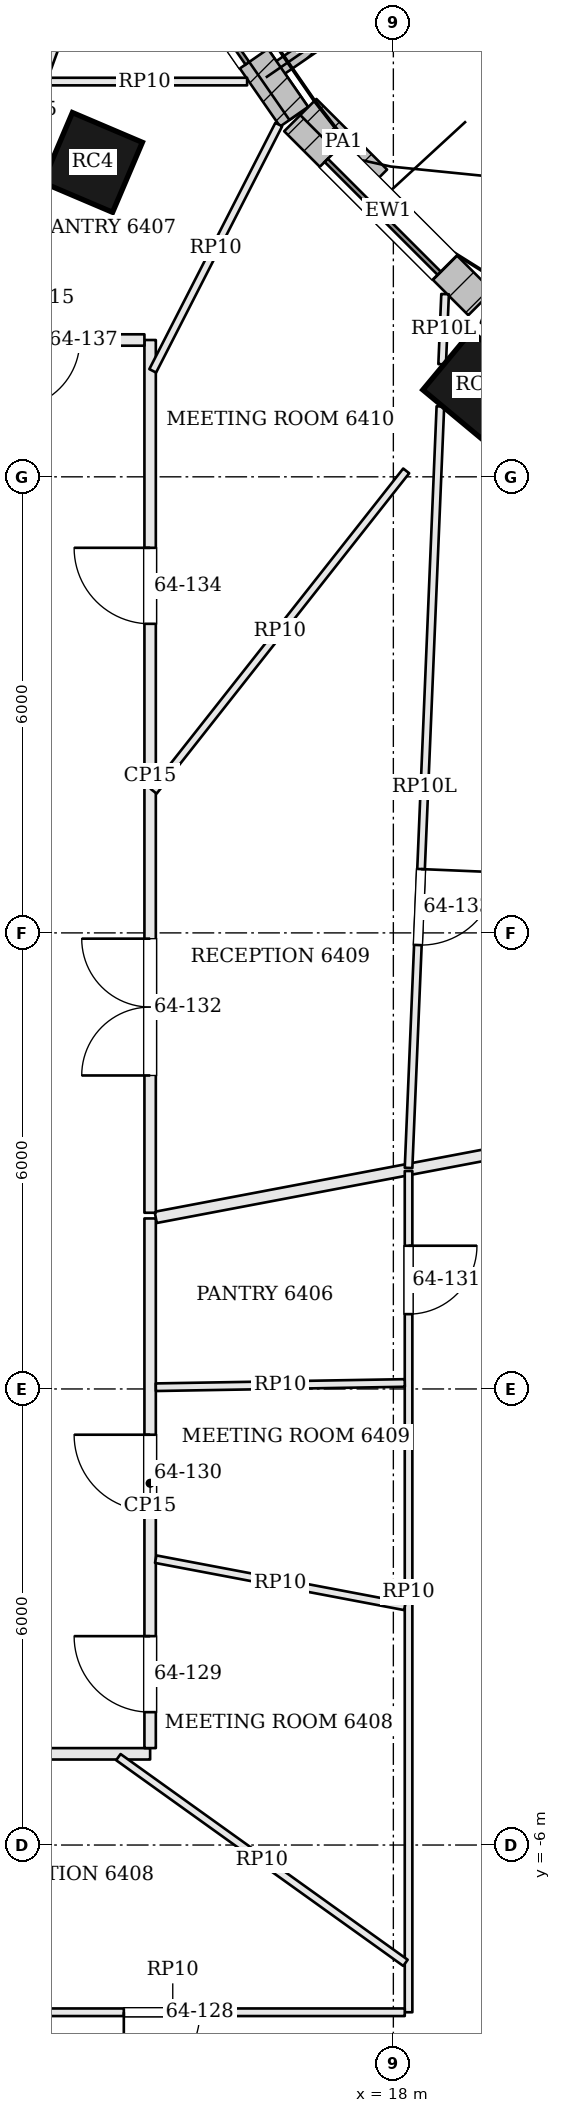
"""IFC4 building model, lengths in metres.
Left out: names, types, materials, properties, quantities, classifications, styles, units other than length and angle.
Written with IfcOpenShell. Run it as: python <this file> out.ifc"""

import sys

from ifc_helpers import new_model, si_unit, direction, frame, frame_2d, origin, origin_2d, place, context, subcontext, project, spatial, rectangle, extrude, element, fill, save


model = new_model("IFC4")
c1 = context("Model", 3, precision=1e-05, world=origin(), true_north=direction((0.0, 1.0)))
c2 = subcontext(c1, "Body", "Model", "MODEL_VIEW")
j1 = project(units=[si_unit("LENGTHUNIT", "METRE"), si_unit("PLANEANGLEUNIT", "RADIAN")], contexts=[c1])
p1 = place(None, origin())
s1 = spatial("IfcSite", under=j1, at=p1, CompositionType="ELEMENT")
p2 = place(p1, origin())
s2 = spatial("IfcBuilding", under=s1, at=p2, CompositionType="ELEMENT")
p3 = place(p2, frame((0.0, 0.0, 260.4)))
s3 = spatial("IfcBuildingStorey", under=s2, at=p3, CompositionType="ELEMENT", Elevation=260.4)
for number, where, z_axis, x_axis in (
    (1, (19.092, 13.209, 0.0), (0.0, 0.0, 1.0), (-0.769, 0.639, 0.0)),
    (2, (14.042, 16.136, 0.0), (0.0, 0.0, 1.0), (-0.92, 0.392, 0.0)),
):
    element("IfcColumn", number, at=place(p3, frame(where, z_axis=z_axis, x_axis=x_axis)), inside=s3, PredefinedType="COLUMN", context=c2, shape_type="SweptSolid", body=[
        extrude(rectangle(XDim=1.0, YDim=1.0, at=origin_2d()), origin(), (0.0, 0.0, 1.0), 3.1),
    ])
p4 = place(p3, frame((19.145, 14.285, 0.0), z_axis=(0.0, 0.0, 1.0), x_axis=(-0.707427521052, 0.706785895769, 0.0)))
e3 = element("IfcWall", 3, at=p4, inside=s3, PredefinedType="SOLIDWALL", context=c2, shape_type="SweptSolid", body=[
    extrude(rectangle(XDim=3.425, YDim=0.45, at=frame_2d((1.712, 0.0))), origin(), (0.0, 0.0, 1.0), 3.6),
])
p5 = place(p4, frame((0.662, 0.0, 0.9)))
e4 = element("IfcOpeningElement", 4, at=p5, cuts=e3, PredefinedType="OPENING", context=c2, shape_type="SweptSolid", body=[
    extrude(rectangle(XDim=2.1, YDim=1.8, at=frame_2d((1.05, 0.9))), frame((0.0, 0.235, 0.0), z_axis=(0.0, -1.0, 0.0), x_axis=(1.0, 0.0, 0.0)), (0.0, 0.0, 1.0), 0.47),
])
p6 = place(p3, frame((16.695, 16.737, 0.0), z_axis=(0.0, 0.0, 1.0), x_axis=(-0.569652445465, 0.821885692402, 0.0)))
e5 = element("IfcWall", 5, at=p6, inside=s3, PredefinedType="SOLIDWALL", context=c2, shape_type="SweptSolid", body=[
    extrude(rectangle(XDim=3.959, YDim=0.45, at=frame_2d((1.979, 0.0))), origin(), (0.0, 0.0, 1.0), 3.6),
])
p7 = place(p6, frame((0.929, 0.0, 0.9)))
e6 = element("IfcOpeningElement", 6, at=p7, cuts=e5, PredefinedType="OPENING", context=c2, shape_type="SweptSolid", body=[
    extrude(rectangle(XDim=2.1, YDim=1.8, at=frame_2d((1.05, 0.9))), frame((0.0, 0.235, 0.0), z_axis=(0.0, -1.0, 0.0), x_axis=(1.0, 0.0, 0.0)), (0.0, 0.0, 1.0), 0.47),
])
p8 = place(p3, frame((16.322, 17.253, 0.0), z_axis=(0.0, 0.0, 1.0), x_axis=(0.824440606412, 0.565948483962, 0.0)))
e7 = element("IfcWall", 7, at=p8, inside=s3, PredefinedType="SOLIDWALL", context=c2, shape_type="SweptSolid", body=[
    extrude(rectangle(XDim=1.75, YDim=0.2, at=frame_2d((0.875, 0.0))), origin(), (0.0, 0.0, 1.0), 3.6),
])
p9 = place(p3, frame((17.811, 15.936, 3.9), z_axis=(0.0, 0.0, 1.0), x_axis=(-0.707385370732, 0.706828081837, 0.0)))
e8 = element("IfcWall", 8, at=p9, inside=s3, PredefinedType="PARAPET", context=c2, shape_type="SweptSolid", body=[
    extrude(rectangle(XDim=1.314, YDim=0.3, at=frame_2d((0.657, 0.0))), origin(), (0.0, 0.0, 1.0), 1.1),
])
p10 = place(p3, frame((16.755, 16.781, 3.9), z_axis=(0.0, 0.0, 1.0), x_axis=(-0.569678588486, 0.821867571948, 0.0)))
e9 = element("IfcWall", 9, at=p10, inside=s3, PredefinedType="PARAPET", context=c2, shape_type="SweptSolid", body=[
    extrude(rectangle(XDim=3.873, YDim=0.3, at=frame_2d((1.937, 0.0))), origin(), (0.0, 0.0, 1.0), 1.1),
])
p11 = place(p3, frame((14.301, 19.789, 0.0), z_axis=(0.0, 0.0, 1.0), x_axis=(-0.342247171487, -0.939609958232, 0.0)))
e10 = element("IfcWall", 10, at=p11, inside=s3, PredefinedType="PARTITIONING", context=c2, shape_type="SweptSolid", body=[
    extrude(rectangle(XDim=6.299, YDim=0.15, at=frame_2d((3.149, 0.0))), origin(), (0.0, 0.0, 1.0), 2.984),
])
p12 = place(p3, frame((16.078, -16.125, 0.0), z_axis=(0.0, 0.0, 1.0), x_axis=(-0.455549457852, 0.890210475927, 0.0)))
e11 = element("IfcWall", 11, at=p12, inside=s3, PredefinedType="PARTITIONING", context=c2, shape_type="SweptSolid", body=[
    extrude(rectangle(XDim=12.646, YDim=0.15, at=frame_2d((6.323, 0.0))), origin(), (0.0, 0.0, 1.0), 2.984),
])
p13 = place(p3, frame((10.358, -4.8, 0.0), z_axis=(0.0, 0.0, 1.0), x_axis=(1.0, 0.0, 0.0)))
e12 = element("IfcWall", 12, at=p13, inside=s3, PredefinedType="PARTITIONING", context=c2, shape_type="SweptSolid", body=[
    extrude(rectangle(XDim=4.442, YDim=0.15, at=frame_2d((2.221, 0.0))), origin(), (0.0, 0.0, 1.0), 2.984),
])
p14 = place(p13, frame((1.444, 0.0, 0.0)))
e13 = element("IfcOpeningElement", 13, at=p14, cuts=e12, PredefinedType="OPENING", context=c2, shape_type="SweptSolid", body=[
    extrude(rectangle(XDim=1.0, YDim=2.1, at=frame_2d((0.5, 1.05))), frame((0.0, 0.085, 0.0), z_axis=(0.0, -1.0, 0.0), x_axis=(1.0, 0.0, 0.0)), (0.0, 0.0, 1.0), 0.17),
])
p15 = place(p3, frame((14.8, -4.725, 0.0), z_axis=(0.0, 0.0, 1.0), x_axis=(0.0, 1.0, 0.0)))
e14 = element("IfcWall", 14, at=p15, inside=s3, PredefinedType="PARTITIONING", context=c2, shape_type="SweptSolid", body=[
    extrude(rectangle(XDim=6.968, YDim=0.15, at=frame_2d((3.484, 0.0))), origin(), (0.0, 0.0, 1.0), 2.984),
])
p16 = place(p15, frame((0.473, 0.0, 0.0)))
e15 = element("IfcOpeningElement", 15, at=p16, cuts=e14, PredefinedType="OPENING", context=c2, shape_type="SweptSolid", body=[
    extrude(rectangle(XDim=1.0, YDim=2.4, at=frame_2d((0.5, 1.2))), frame((0.0, 0.085, 0.0), z_axis=(0.0, -1.0, 0.0), x_axis=(1.0, 0.0, 0.0)), (0.0, 0.0, 1.0), 0.17),
])
p17 = place(p15, frame((3.123, 0.0, 0.0)))
e16 = element("IfcOpeningElement", 16, at=p17, cuts=e14, PredefinedType="OPENING", context=c2, shape_type="SweptSolid", body=[
    extrude(rectangle(XDim=1.0, YDim=2.4, at=frame_2d((0.5, 1.2))), frame((0.0, 0.085, 0.0), z_axis=(0.0, -1.0, 0.0), x_axis=(1.0, 0.0, 0.0)), (0.0, 0.0, 1.0), 0.17),
])
p18 = place(p3, frame((27.332, 4.618, 0.0), z_axis=(0.0, 0.0, 1.0), x_axis=(-0.982506027703, -0.186230785661, 0.0)))
e17 = element("IfcWall", 17, at=p18, inside=s3, PredefinedType="PARTITIONING", context=c2, shape_type="SweptSolid", body=[
    extrude(rectangle(XDim=12.68, YDim=0.15, at=frame_2d((6.34, 0.0))), origin(), (0.0, 0.0, 1.0), 2.58),
])
p19 = place(p3, frame((14.8, 2.318, 0.0), z_axis=(0.0, 0.0, 1.0), x_axis=(0.0, 1.0, 0.0)))
e18 = element("IfcWall", 18, at=p19, inside=s3, PredefinedType="PARTITIONING", context=c2, shape_type="SweptSolid", body=[
    extrude(rectangle(XDim=11.482, YDim=0.15, at=frame_2d((5.741, 0.0))), origin(), (0.0, 0.0, 1.0), 2.984),
])
p20 = place(p19, frame((1.806, 0.0, 0.0)))
e19 = element("IfcOpeningElement", 19, at=p20, cuts=e18, PredefinedType="OPENING", context=c2, shape_type="SweptSolid", body=[
    extrude(rectangle(XDim=1.8, YDim=2.1, at=frame_2d((0.9, 1.05))), frame((0.0, 0.085, 0.0), z_axis=(0.0, -1.0, 0.0), x_axis=(1.0, 0.0, 0.0)), (0.0, 0.0, 1.0), 0.17),
])
p21 = place(p19, frame((7.748, 0.0, 0.0)))
e20 = element("IfcOpeningElement", 20, at=p21, cuts=e18, PredefinedType="OPENING", context=c2, shape_type="SweptSolid", body=[
    extrude(rectangle(XDim=1.0, YDim=2.4, at=frame_2d((0.5, 1.2))), frame((0.0, 0.085, 0.0), z_axis=(0.0, -1.0, 0.0), x_axis=(1.0, 0.0, 0.0)), (0.0, 0.0, 1.0), 0.17),
])
p22 = place(p3, frame((14.725, 13.8, 0.0), z_axis=(0.0, 0.0, 1.0), x_axis=(-1.0, 0.0, 0.0)))
e21 = element("IfcWall", 21, at=p22, inside=s3, PredefinedType="PARTITIONING", context=c2, shape_type="SweptSolid", body=[
    extrude(rectangle(XDim=2.531, YDim=0.15, at=frame_2d((1.266, 0.0))), origin(), (0.0, 0.0, 1.0), 2.984),
])
p23 = place(p22, frame((0.85, 0.0, 0.0)))
e22 = element("IfcOpeningElement", 22, at=p23, cuts=e21, PredefinedType="OPENING", context=c2, shape_type="SweptSolid", body=[
    extrude(rectangle(XDim=0.9, YDim=2.1, at=frame_2d((0.45, 1.05))), frame((0.0, 0.085, 0.0), z_axis=(0.0, -1.0, 0.0), x_axis=(1.0, 0.0, 0.0)), (0.0, 0.0, 1.0), 0.17),
])
p24 = place(p3, frame((18.2, 2.867, 0.0), z_axis=(0.0, 0.0, 1.0), x_axis=(0.0, -1.0, 0.0)))
e23 = element("IfcWall", 23, at=p24, inside=s3, PredefinedType="PARTITIONING", context=c2, shape_type="SweptSolid", body=[
    extrude(rectangle(XDim=11.067, YDim=0.1, at=frame_2d((5.534, 0.0))), origin(), (0.0, 0.0, 1.0), 2.984),
])
p25 = place(p24, frame((0.983, 0.0, 0.0)))
e24 = element("IfcOpeningElement", 24, at=p25, cuts=e23, PredefinedType="OPENING", context=c2, shape_type="SweptSolid", body=[
    extrude(rectangle(XDim=0.9, YDim=2.1, at=frame_2d((0.45, 1.05))), frame((0.0, 0.06, 0.0), z_axis=(0.0, -1.0, 0.0), x_axis=(1.0, 0.0, 0.0)), (0.0, 0.0, 1.0), 0.12),
])
p26 = place(p3, frame((18.15, -8.2, 0.0), z_axis=(0.0, 0.0, 1.0), x_axis=(-1.0, 0.0, 0.0)))
e25 = element("IfcWall", 25, at=p26, inside=s3, PredefinedType="PARTITIONING", context=c2, shape_type="SweptSolid", body=[
    extrude(rectangle(XDim=6.104, YDim=0.1, at=frame_2d((3.052, 0.0))), origin(), (0.0, 0.0, 1.0), 2.984),
])
p27 = place(p26, frame((2.696, 0.0, 0.0)))
e26 = element("IfcOpeningElement", 26, at=p27, cuts=e25, PredefinedType="OPENING", context=c2, shape_type="SweptSolid", body=[
    extrude(rectangle(XDim=1.0, YDim=2.1, at=frame_2d((0.5, 1.05))), frame((0.0, 0.06, 0.0), z_axis=(0.0, -1.0, 0.0), x_axis=(1.0, 0.0, 0.0)), (0.0, 0.0, 1.0), 0.12),
])
p28 = place(p3, frame((14.382, -4.844, 0.0), z_axis=(0.0, 0.0, 1.0), x_axis=(0.812905436978, -0.582395699273, 0.0)))
e27 = element("IfcWall", 27, at=p28, inside=s3, PredefinedType="PARTITIONING", context=c2, shape_type="SweptSolid", body=[
    extrude(rectangle(XDim=4.646, YDim=0.1, at=frame_2d((2.323, 0.0))), origin(), (0.0, 0.0, 1.0), 2.984),
])
p29 = place(p3, frame((14.874, -2.239, 0.0), z_axis=(0.0, 0.0, 1.0), x_axis=(0.982523240233, -0.186139953804, 0.0)))
e28 = element("IfcWall", 28, at=p29, inside=s3, PredefinedType="PARTITIONING", context=c2, shape_type="SweptSolid", body=[
    extrude(rectangle(XDim=3.335, YDim=0.1, at=frame_2d((1.668, 0.0))), origin(), (0.0, 0.0, 1.0), 2.984),
])
p30 = place(p3, frame((14.875, 0.023, 0.0), z_axis=(0.0, 0.0, 1.0), x_axis=(0.999854310099, 0.017069228941, 0.0)))
e29 = element("IfcWall", 29, at=p30, inside=s3, PredefinedType="PARTITIONING", context=c2, shape_type="SweptSolid", body=[
    extrude(rectangle(XDim=3.275, YDim=0.1, at=frame_2d((1.638, 0.0))), origin(), (0.0, 0.0, 1.0), 2.984),
])
p31 = place(p3, frame((13.379, 17.2, 0.0), z_axis=(0.0, 0.0, 1.0), x_axis=(1.0, 0.0, 0.0)))
e30 = element("IfcWall", 30, at=p31, inside=s3, PredefinedType="PARTITIONING", context=c2, shape_type="SweptSolid", body=[
    extrude(rectangle(XDim=2.697, YDim=0.1, at=frame_2d((1.349, 0.0))), origin(), (0.0, 0.0, 1.0), 2.984),
])
p32 = place(p3, frame((18.681, 14.404, 0.0), z_axis=(0.0, 0.0, 1.0), x_axis=(-0.04178454469, -0.999126644538, 0.0)))
e31 = element("IfcWall", 31, at=p32, inside=s3, PredefinedType="PARTITIONING", context=c2, shape_type="SweptSolid", body=[
    extrude(rectangle(XDim=0.923, YDim=0.1, at=frame_2d((0.461, 0.0))), origin(), (0.0, 0.0, 1.0), 2.58),
])
p33 = place(p3, frame((18.619, 12.926, 0.0), z_axis=(0.0, 0.0, 1.0), x_axis=(-0.041781443757, -0.999126774217, 0.0)))
e32 = element("IfcWall", 32, at=p33, inside=s3, PredefinedType="PARTITIONING", context=c2, shape_type="SweptSolid", body=[
    extrude(rectangle(XDim=10.027, YDim=0.1, at=frame_2d((5.014, 0.0))), origin(), (0.0, 0.0, 1.0), 2.58),
])
p34 = place(p33, frame((6.092, 0.0, 0.0)))
e33 = element("IfcOpeningElement", 33, at=p34, cuts=e32, PredefinedType="OPENING", context=c2, shape_type="SweptSolid", body=[
    extrude(rectangle(XDim=1.0, YDim=2.1, at=frame_2d((0.5, 1.05))), frame((0.0, 0.06, 0.0), z_axis=(0.0, -1.0, 0.0), x_axis=(1.0, 0.0, 0.0)), (0.0, 0.0, 1.0), 0.12),
])
p35 = place(p3, frame((14.846, 7.863, 0.0), z_axis=(0.0, 0.0, 1.0), x_axis=(0.619070377388, 0.785335512912, 0.0)))
e34 = element("IfcWall", 34, at=p35, inside=s3, PredefinedType="PARTITIONING", context=c2, shape_type="SweptSolid", body=[
    extrude(rectangle(XDim=5.367, YDim=0.1, at=frame_2d((2.684, 0.0))), origin(), (0.0, 0.0, 1.0), 2.984),
])
p36 = place(p3, frame((14.834, 13.394, 0.0), z_axis=(0.0, 0.0, 1.0), x_axis=(0.455511656282, 0.890229819199, 0.0)))
e35 = element("IfcWall", 35, at=p36, inside=s3, PredefinedType="PARTITIONING", context=c2, shape_type="SweptSolid", body=[
    extrude(rectangle(XDim=3.64, YDim=0.1, at=frame_2d((1.82, 0.0))), origin(), (0.0, 0.0, 1.0), 2.984),
])
p37 = place(p5, origin())
e36 = element("IfcWindow", 36, at=p37, inside=s3, PartitioningType="SINGLE_PANEL", PredefinedType="WINDOW", context=c2, shape_type="SweptSolid", body=[
    extrude(rectangle(XDim=2.1, YDim=1.8, at=frame_2d((1.05, 0.9))), frame((0.0, 0.135, 0.0), z_axis=(0.0, -1.0, 0.0), x_axis=(1.0, 0.0, 0.0)), (0.0, 0.0, 1.0), 0.06),
])
fill(e4, e36)
p38 = place(p7, origin())
e37 = element("IfcWindow", 37, at=p38, inside=s3, PartitioningType="SINGLE_PANEL", PredefinedType="WINDOW", context=c2, shape_type="SweptSolid", body=[
    extrude(rectangle(XDim=2.1, YDim=1.8, at=frame_2d((1.05, 0.9))), frame((0.0, 0.135, 0.0), z_axis=(0.0, -1.0, 0.0), x_axis=(1.0, 0.0, 0.0)), (0.0, 0.0, 1.0), 0.06),
])
fill(e6, e37)
p39 = place(p27, origin())
e38 = element("IfcDoor", 38, at=p39, inside=s3, OperationType="SINGLE_SWING_RIGHT", PredefinedType="DOOR", context=c2, shape_type="SweptSolid", body=[
    extrude(rectangle(XDim=1.0, YDim=2.1, at=frame_2d((0.5, 1.05))), frame((0.0, 0.025, 0.0), z_axis=(0.0, -1.0, 0.0), x_axis=(1.0, 0.0, 0.0)), (0.0, 0.0, 1.0), 0.05),
])
fill(e26, e38)
p40 = place(p16, origin())
e39 = element("IfcDoor", 39, at=p40, inside=s3, OperationType="SINGLE_SWING_RIGHT", PredefinedType="DOOR", context=c2, shape_type="SweptSolid", body=[
    extrude(rectangle(XDim=1.0, YDim=2.4, at=frame_2d((0.5, 1.2))), frame((0.0, 0.025, 0.0), z_axis=(0.0, -1.0, 0.0), x_axis=(1.0, 0.0, 0.0)), (0.0, 0.0, 1.0), 0.05),
])
fill(e15, e39)
p41 = place(p17, origin())
e40 = element("IfcDoor", 40, at=p41, inside=s3, OperationType="SINGLE_SWING_RIGHT", PredefinedType="DOOR", context=c2, shape_type="SweptSolid", body=[
    extrude(rectangle(XDim=1.0, YDim=2.4, at=frame_2d((0.5, 1.2))), frame((0.0, 0.025, 0.0), z_axis=(0.0, -1.0, 0.0), x_axis=(1.0, 0.0, 0.0)), (0.0, 0.0, 1.0), 0.05),
])
fill(e16, e40)
p42 = place(p25, origin())
e41 = element("IfcDoor", 41, at=p42, inside=s3, OperationType="SINGLE_SWING_LEFT", PredefinedType="DOOR", context=c2, shape_type="SweptSolid", body=[
    extrude(rectangle(XDim=0.9, YDim=2.1, at=frame_2d((0.45, 1.05))), frame((0.0, 0.025, 0.0), z_axis=(0.0, -1.0, 0.0), x_axis=(1.0, 0.0, 0.0)), (0.0, 0.0, 1.0), 0.05),
])
fill(e24, e41)
p43 = place(p20, origin())
e42 = element("IfcDoor", 42, at=p43, inside=s3, OperationType="DOUBLE_DOOR_SINGLE_SWING", PredefinedType="DOOR", context=c2, shape_type="SweptSolid", body=[
    extrude(rectangle(XDim=1.8, YDim=2.1, at=frame_2d((0.9, 1.05))), frame((0.0, 0.025, 0.0), z_axis=(0.0, -1.0, 0.0), x_axis=(1.0, 0.0, 0.0)), (0.0, 0.0, 1.0), 0.05),
])
fill(e19, e42)
p44 = place(p34, origin())
e43 = element("IfcDoor", 43, at=p44, inside=s3, OperationType="SINGLE_SWING_LEFT", PredefinedType="DOOR", context=c2, shape_type="SweptSolid", body=[
    extrude(rectangle(XDim=1.0, YDim=2.1, at=frame_2d((0.5, 1.05))), frame((0.0, 0.025, 0.0), z_axis=(0.0, -1.0, 0.0), x_axis=(1.0, 0.0, 0.0)), (0.0, 0.0, 1.0), 0.05),
])
fill(e33, e43)
p45 = place(p21, origin())
e44 = element("IfcDoor", 44, at=p45, inside=s3, OperationType="SINGLE_SWING_RIGHT", PredefinedType="DOOR", context=c2, shape_type="SweptSolid", body=[
    extrude(rectangle(XDim=1.0, YDim=2.4, at=frame_2d((0.5, 1.2))), frame((0.0, 0.025, 0.0), z_axis=(0.0, -1.0, 0.0), x_axis=(1.0, 0.0, 0.0)), (0.0, 0.0, 1.0), 0.05),
])
fill(e20, e44)
p46 = place(p23, origin())
e45 = element("IfcDoor", 45, at=p46, inside=s3, OperationType="SINGLE_SWING_RIGHT", PredefinedType="DOOR", context=c2, shape_type="SweptSolid", body=[
    extrude(rectangle(XDim=0.9, YDim=2.1, at=frame_2d((0.45, 1.05))), frame((0.0, 0.025, 0.0), z_axis=(0.0, -1.0, 0.0), x_axis=(1.0, 0.0, 0.0)), (0.0, 0.0, 1.0), 0.05),
])
fill(e22, e45)
save(model, sys.argv[1])
